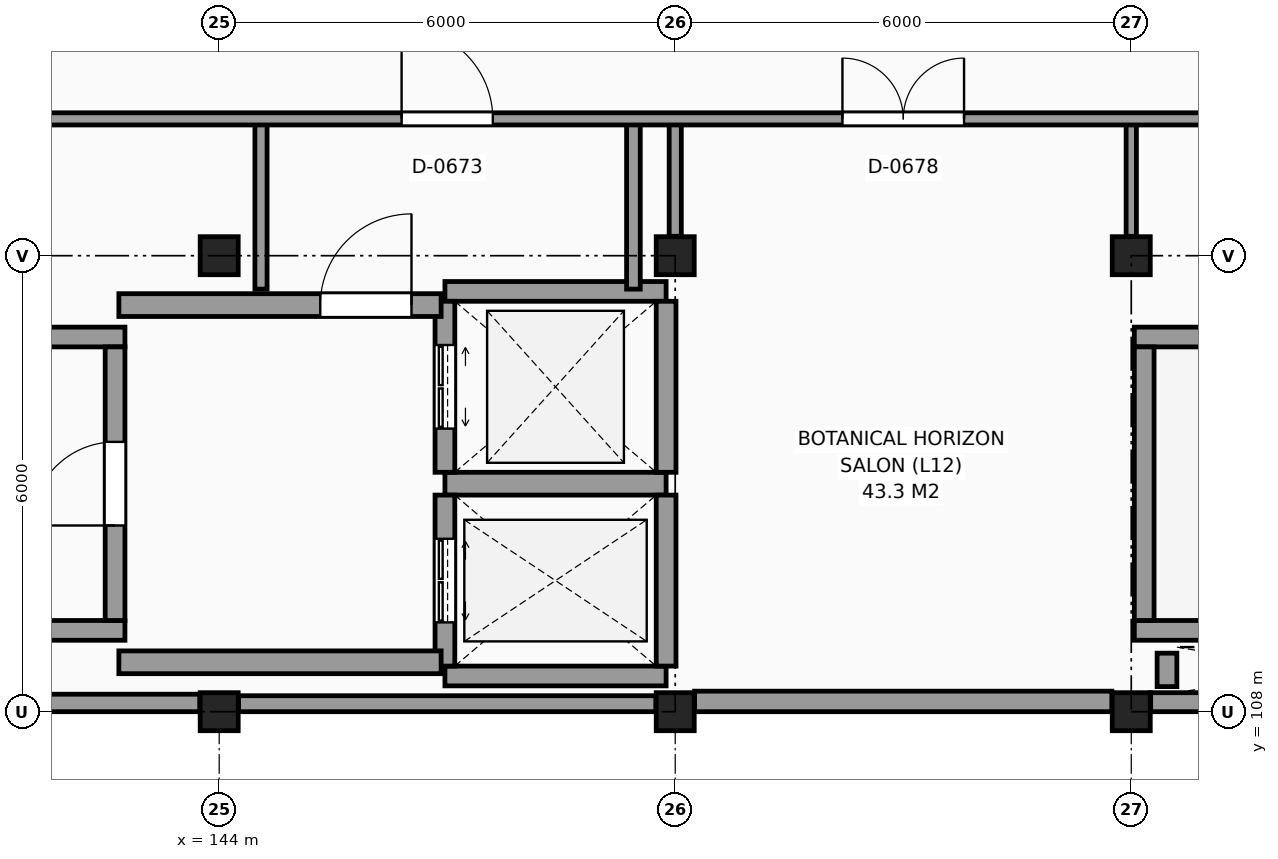
"""IFC4 building model, lengths in metres.
Left out: names, types, materials, properties, quantities, classifications, styles, units other than length and angle.
Written with IfcOpenShell. Run it as: python <this file> out.ifc"""

import sys

from ifc_helpers import new_model, si_unit, direction, frame, frame_2d, origin, origin_2d, place, context, subcontext, project, spatial, rectangle, extrude, element, fill, save


model = new_model("IFC4")
c1 = context("Model", 3, precision=1e-05, world=origin(), true_north=direction((0.0, 1.0)))
c2 = subcontext(c1, "Body", "Model", "MODEL_VIEW")
j1 = project(units=[si_unit("LENGTHUNIT", "METRE"), si_unit("PLANEANGLEUNIT", "RADIAN")], contexts=[c1])
p1 = place(None, origin())
s1 = spatial("IfcSite", under=j1, at=p1, CompositionType="ELEMENT")
p2 = place(p1, origin())
s2 = spatial("IfcBuilding", under=s1, at=p2, CompositionType="ELEMENT")
p3 = place(p2, frame((0.0, 0.0, 48.0)))
s3 = spatial("IfcBuildingStorey", under=s2, at=p3, CompositionType="ELEMENT", Elevation=48.0)
for number, where, z_axis, x_axis in (
    (1, (144.0, 108.0, 0.0), (0.0, 0.0, 1.0), (1.0, 0.0, 0.0)),
    (2, (144.0, 114.0, 0.0), (0.0, 0.0, 1.0), (1.0, 0.0, 0.0)),
    (3, (150.0, 108.0, 0.0), (0.0, 0.0, 1.0), (1.0, 0.0, 0.0)),
    (4, (150.0, 114.0, 0.0), (0.0, 0.0, 1.0), (1.0, 0.0, 0.0)),
    (5, (156.0, 108.0, 0.0), (0.0, 0.0, 1.0), (1.0, 0.0, 0.0)),
    (6, (156.0, 114.0, 0.0), (0.0, 0.0, 1.0), (1.0, 0.0, 0.0)),
):
    element("IfcColumn", number, at=place(p3, frame(where, z_axis=z_axis, x_axis=x_axis)), inside=s3, PredefinedType="COLUMN", context=c2, shape_type="SweptSolid", body=[
        extrude(rectangle(XDim=0.5, YDim=0.5, at=origin_2d()), origin(), (0.0, 0.0, 1.0), 3.3),
    ])
p4 = place(p3, frame((138.255, 108.115, 0.0), z_axis=(0.0, 0.0, 1.0), x_axis=(1.0, 0.0, 0.0)))
e7 = element("IfcWall", 7, at=p4, inside=s3, PredefinedType="SOLIDWALL", context=c2, shape_type="SweptSolid", body=[
    extrude(rectangle(XDim=5.49, YDim=0.23, at=frame_2d((2.745, 0.0))), origin(), (0.0, 0.0, 1.0), 2.4),
])
p5 = place(p3, frame((144.255, 108.105, 0.0), z_axis=(0.0, 0.0, 1.0), x_axis=(1.0, 0.0, 0.0)))
e8 = element("IfcWall", 8, at=p5, inside=s3, PredefinedType="SOLIDWALL", context=c2, shape_type="SweptSolid", body=[
    extrude(rectangle(XDim=5.49, YDim=0.21, at=frame_2d((2.745, 0.0))), origin(), (0.0, 0.0, 1.0), 2.4),
])
p6 = place(p3, frame((150.255, 108.135, 0.0), z_axis=(0.0, 0.0, 1.0), x_axis=(1.0, 0.0, 0.0)))
e9 = element("IfcWall", 9, at=p6, inside=s3, PredefinedType="SOLIDWALL", context=c2, shape_type="SweptSolid", body=[
    extrude(rectangle(XDim=5.49, YDim=0.27, at=frame_2d((2.745, 0.0))), origin(), (0.0, 0.0, 1.0), 2.4),
])
p7 = place(p3, frame((156.255, 108.125, 0.0), z_axis=(0.0, 0.0, 1.0), x_axis=(1.0, 0.0, 0.0)))
e10 = element("IfcWall", 10, at=p7, inside=s3, PredefinedType="SOLIDWALL", context=c2, shape_type="SweptSolid", body=[
    extrude(rectangle(XDim=5.49, YDim=0.25, at=frame_2d((2.745, 0.0))), origin(), (0.0, 0.0, 1.0), 3.05),
])
for number, where, z_axis, x_axis in (
    (11, (156.04, 109.07, 0.0), (0.0, 0.0, 1.0), (1.0, 0.0, 0.0)),
    (12, (156.04, 112.93, 0.0), (0.0, 0.0, 1.0), (1.0, 0.0, 0.0)),
):
    element("IfcWall", number, at=place(p3, frame(where, z_axis=z_axis, x_axis=x_axis)), inside=s3, PredefinedType="SHEAR", context=c2, shape_type="SweptSolid", body=[
        extrude(rectangle(XDim=10.72, YDim=0.26, at=frame_2d((5.36, 0.0))), origin(), (0.0, 0.0, 1.0), 3.3),
    ])
p8 = place(p3, frame((156.17, 109.2, 0.0), z_axis=(0.0, 0.0, 1.0), x_axis=(0.0, 1.0, 0.0)))
e13 = element("IfcWall", 13, at=p8, inside=s3, PredefinedType="SHEAR", context=c2, shape_type="SweptSolid", body=[
    extrude(rectangle(XDim=3.6, YDim=0.26, at=frame_2d((1.8, 0.0))), origin(), (0.0, 0.0, 1.0), 3.3),
])
p9 = place(p3, frame((156.47, 108.33, 0.0), z_axis=(0.0, 0.0, 1.0), x_axis=(0.0, 1.0, 0.0)))
e14 = element("IfcWall", 14, at=p9, inside=s3, PredefinedType="SHEAR", context=c2, shape_type="SweptSolid", body=[
    extrude(rectangle(XDim=0.44, YDim=0.26, at=frame_2d((0.22, 0.0))), origin(), (0.0, 0.0, 1.0), 3.3),
])
for number, where, z_axis, x_axis in (
    (15, (132.04, 109.07, 0.0), (0.0, 0.0, 1.0), (1.0, 0.0, 0.0)),
    (16, (132.04, 112.93, 0.0), (0.0, 0.0, 1.0), (1.0, 0.0, 0.0)),
):
    element("IfcWall", number, at=place(p3, frame(where, z_axis=z_axis, x_axis=x_axis)), inside=s3, PredefinedType="SHEAR", context=c2, shape_type="SweptSolid", body=[
        extrude(rectangle(XDim=10.72, YDim=0.26, at=frame_2d((5.36, 0.0))), origin(), (0.0, 0.0, 1.0), 3.3),
    ])
p10 = place(p3, frame((142.63, 109.2, 0.0), z_axis=(0.0, 0.0, 1.0), x_axis=(0.0, 1.0, 0.0)))
e17 = element("IfcWall", 17, at=p10, inside=s3, PredefinedType="SHEAR", context=c2, shape_type="SweptSolid", body=[
    extrude(rectangle(XDim=3.6, YDim=0.26, at=frame_2d((1.8, 0.0))), origin(), (0.0, 0.0, 1.0), 3.3),
])
p11 = place(p10, frame((1.25, 0.0, 0.0)))
e18 = element("IfcOpeningElement", 18, at=p11, cuts=e17, PredefinedType="OPENING", context=c2, shape_type="SweptSolid", body=[
    extrude(rectangle(XDim=1.1, YDim=2.15, at=frame_2d((0.55, 1.075))), frame((0.0, 0.14, 0.0), z_axis=(0.0, -1.0, 0.0), x_axis=(1.0, 0.0, 0.0)), (0.0, 0.0, 1.0), 0.28),
])
p12 = place(p3, frame((146.97, 108.47, 0.0), z_axis=(0.0, 0.0, 1.0), x_axis=(1.0, 0.0, 0.0)))
e19 = element("IfcWall", 19, at=p12, inside=s3, PredefinedType="SHEAR", context=c2, shape_type="SweptSolid", body=[
    extrude(rectangle(XDim=2.91, YDim=0.26, at=frame_2d((1.455, 0.0))), origin(), (0.0, 0.0, 1.0), 3.3),
])
p13 = place(p3, frame((146.97, 111.0, 0.0), z_axis=(0.0, 0.0, 1.0), x_axis=(1.0, 0.0, 0.0)))
e20 = element("IfcWall", 20, at=p13, inside=s3, PredefinedType="SHEAR", context=c2, shape_type="SweptSolid", body=[
    extrude(rectangle(XDim=2.91, YDim=0.3, at=frame_2d((1.455, 0.0))), origin(), (0.0, 0.0, 1.0), 3.3),
])
p14 = place(p3, frame((149.88, 108.6, 0.0), z_axis=(0.0, 0.0, 1.0), x_axis=(0.0, 1.0, 0.0)))
e21 = element("IfcWall", 21, at=p14, inside=s3, PredefinedType="SHEAR", context=c2, shape_type="SweptSolid", body=[
    extrude(rectangle(XDim=2.25, YDim=0.26, at=frame_2d((1.125, 0.0))), origin(), (0.0, 0.0, 1.0), 3.3),
])
p15 = place(p3, frame((146.97, 108.6, 0.0), z_axis=(0.0, 0.0, 1.0), x_axis=(0.0, 1.0, 0.0)))
e22 = element("IfcWall", 22, at=p15, inside=s3, PredefinedType="SHEAR", context=c2, shape_type="SweptSolid", body=[
    extrude(rectangle(XDim=2.25, YDim=0.26, at=frame_2d((1.125, 0.0))), origin(), (0.0, 0.0, 1.0), 3.3),
])
p16 = place(p15, frame((0.575, 0.0, 0.0)))
e23 = element("IfcOpeningElement", 23, at=p16, cuts=e22, PredefinedType="OPENING", context=c2, shape_type="SweptSolid", body=[
    extrude(rectangle(XDim=1.1, YDim=2.2, at=frame_2d((0.55, 1.1))), frame((0.0, 0.14, 0.0), z_axis=(0.0, -1.0, 0.0), x_axis=(1.0, 0.0, 0.0)), (0.0, 0.0, 1.0), 0.28),
])
p17 = place(p3, frame((146.97, 113.53, 0.0), z_axis=(0.0, 0.0, 1.0), x_axis=(1.0, 0.0, 0.0)))
e24 = element("IfcWall", 24, at=p17, inside=s3, PredefinedType="SHEAR", context=c2, shape_type="SweptSolid", body=[
    extrude(rectangle(XDim=2.91, YDim=0.26, at=frame_2d((1.455, 0.0))), origin(), (0.0, 0.0, 1.0), 3.3),
])
p18 = place(p3, frame((149.88, 111.15, 0.0), z_axis=(0.0, 0.0, 1.0), x_axis=(0.0, 1.0, 0.0)))
e25 = element("IfcWall", 25, at=p18, inside=s3, PredefinedType="SHEAR", context=c2, shape_type="SweptSolid", body=[
    extrude(rectangle(XDim=2.25, YDim=0.26, at=frame_2d((1.125, 0.0))), origin(), (0.0, 0.0, 1.0), 3.3),
])
p19 = place(p3, frame((146.97, 111.15, 0.0), z_axis=(0.0, 0.0, 1.0), x_axis=(0.0, 1.0, 0.0)))
e26 = element("IfcWall", 26, at=p19, inside=s3, PredefinedType="SHEAR", context=c2, shape_type="SweptSolid", body=[
    extrude(rectangle(XDim=2.25, YDim=0.26, at=frame_2d((1.125, 0.0))), origin(), (0.0, 0.0, 1.0), 3.3),
])
p20 = place(p19, frame((0.575, 0.0, 0.0)))
e27 = element("IfcOpeningElement", 27, at=p20, cuts=e26, PredefinedType="OPENING", context=c2, shape_type="SweptSolid", body=[
    extrude(rectangle(XDim=1.1, YDim=2.2, at=frame_2d((0.55, 1.1))), frame((0.0, 0.14, 0.0), z_axis=(0.0, -1.0, 0.0), x_axis=(1.0, 0.0, 0.0)), (0.0, 0.0, 1.0), 0.28),
])
p21 = place(p3, frame((142.68, 113.35, 0.0), z_axis=(0.0, 0.0, 1.0), x_axis=(1.0, 0.0, 0.0)))
e28 = element("IfcWall", 28, at=p21, inside=s3, PredefinedType="SHEAR", context=c2, shape_type="SweptSolid", body=[
    extrude(rectangle(XDim=4.24, YDim=0.3, at=frame_2d((2.12, 0.0))), origin(), (0.0, 0.0, 1.0), 3.3),
])
p22 = place(p21, frame((2.65, 0.0, 0.0)))
e29 = element("IfcOpeningElement", 29, at=p22, cuts=e28, PredefinedType="OPENING", context=c2, shape_type="SweptSolid", body=[
    extrude(rectangle(XDim=1.2, YDim=2.2, at=frame_2d((0.6, 1.1))), frame((0.0, 0.16, 0.0), z_axis=(0.0, -1.0, 0.0), x_axis=(1.0, 0.0, 0.0)), (0.0, 0.0, 1.0), 0.32),
])
p23 = place(p3, frame((142.68, 108.65, 0.0), z_axis=(0.0, 0.0, 1.0), x_axis=(1.0, 0.0, 0.0)))
e30 = element("IfcWall", 30, at=p23, inside=s3, PredefinedType="SHEAR", context=c2, shape_type="SweptSolid", body=[
    extrude(rectangle(XDim=4.24, YDim=0.3, at=frame_2d((2.12, 0.0))), origin(), (0.0, 0.0, 1.0), 3.3),
])
p24 = place(p3, frame((144.55, 113.56, 0.0), z_axis=(0.0, 0.0, 1.0), x_axis=(0.0, 1.0, 0.0)))
e31 = element("IfcWall", 31, at=p24, inside=s3, PredefinedType="PARTITIONING", context=c2, shape_type="SweptSolid", body=[
    extrude(rectangle(XDim=2.24, YDim=0.16, at=frame_2d((1.12, 0.0))), origin(), (0.0, 0.0, 1.0), 3.05),
])
p25 = place(p3, frame((149.45, 113.56, 0.0), z_axis=(0.0, 0.0, 1.0), x_axis=(0.0, 1.0, 0.0)))
e32 = element("IfcWall", 32, at=p25, inside=s3, PredefinedType="PARTITIONING", context=c2, shape_type="SweptSolid", body=[
    extrude(rectangle(XDim=2.24, YDim=0.18, at=frame_2d((1.12, 0.0))), origin(), (0.0, 0.0, 1.0), 3.05),
])
p26 = place(p3, frame((150.0, 114.255, 0.0), z_axis=(0.0, 0.0, 1.0), x_axis=(0.0, 1.0, 0.0)))
e33 = element("IfcWall", 33, at=p26, inside=s3, PredefinedType="PARTITIONING", context=c2, shape_type="SweptSolid", body=[
    extrude(rectangle(XDim=1.545, YDim=0.16, at=frame_2d((0.772, 0.0))), origin(), (0.0, 0.0, 1.0), 2.5),
])
p27 = place(p3, frame((156.0, 114.255, 0.0), z_axis=(0.0, 0.0, 1.0), x_axis=(0.0, 1.0, 0.0)))
e34 = element("IfcWall", 34, at=p27, inside=s3, PredefinedType="PARTITIONING", context=c2, shape_type="SweptSolid", body=[
    extrude(rectangle(XDim=1.545, YDim=0.135, at=frame_2d((0.772, 0.0))), origin(), (0.0, 0.0, 1.0), 2.5),
])
p28 = place(p3, frame((102.235, 115.8, 0.0), z_axis=(0.0, 0.0, 1.0), x_axis=(1.0, 0.0, 0.0)))
e35 = element("IfcWall", 35, at=p28, inside=s3, PredefinedType="PARTITIONING", context=c2, shape_type="SweptSolid", body=[
    extrude(rectangle(XDim=67.565, YDim=0.16, at=frame_2d((33.782, 0.0))), origin(), (0.0, 0.0, 1.0), 3.05),
])
p29 = place(p28, frame((44.165, 0.0, 0.0)))
e36 = element("IfcOpeningElement", 36, at=p29, cuts=e35, PredefinedType="OPENING", context=c2, shape_type="SweptSolid", body=[
    extrude(rectangle(XDim=1.2, YDim=2.2, at=frame_2d((0.6, 1.1))), frame((0.0, 0.09, 0.0), z_axis=(0.0, -1.0, 0.0), x_axis=(1.0, 0.0, 0.0)), (0.0, 0.0, 1.0), 0.18),
])
p30 = place(p28, frame((14.165, 0.0, 0.0)))
e37 = element("IfcOpeningElement", 37, at=p30, cuts=e35, PredefinedType="OPENING", context=c2, shape_type="SweptSolid", body=[
    extrude(rectangle(XDim=1.2, YDim=2.2, at=frame_2d((0.6, 1.1))), frame((0.0, 0.09, 0.0), z_axis=(0.0, -1.0, 0.0), x_axis=(1.0, 0.0, 0.0)), (0.0, 0.0, 1.0), 0.18),
])
p31 = place(p28, frame((19.315, 0.0, 0.0)))
e38 = element("IfcOpeningElement", 38, at=p31, cuts=e35, PredefinedType="OPENING", context=c2, shape_type="SweptSolid", body=[
    extrude(rectangle(XDim=1.0, YDim=2.15, at=frame_2d((0.5, 1.075))), frame((0.0, 0.09, 0.0), z_axis=(0.0, -1.0, 0.0), x_axis=(1.0, 0.0, 0.0)), (0.0, 0.0, 1.0), 0.18),
])
p32 = place(p28, frame((26.285, 0.0, 0.0)))
e39 = element("IfcOpeningElement", 39, at=p32, cuts=e35, PredefinedType="OPENING", context=c2, shape_type="SweptSolid", body=[
    extrude(rectangle(XDim=0.96, YDim=2.15, at=frame_2d((0.48, 1.075))), frame((0.0, 0.09, 0.0), z_axis=(0.0, -1.0, 0.0), x_axis=(1.0, 0.0, 0.0)), (0.0, 0.0, 1.0), 0.18),
])
p33 = place(p28, frame((49.965, 0.0, 0.0)))
e40 = element("IfcOpeningElement", 40, at=p33, cuts=e35, PredefinedType="OPENING", context=c2, shape_type="SweptSolid", body=[
    extrude(rectangle(XDim=1.6, YDim=2.25, at=frame_2d((0.8, 1.125))), frame((0.0, 0.09, 0.0), z_axis=(0.0, -1.0, 0.0), x_axis=(1.0, 0.0, 0.0)), (0.0, 0.0, 1.0), 0.18),
])
p34 = place(p11, origin())
e41 = element("IfcDoor", 41, at=p34, inside=s3, OperationType="SINGLE_SWING_LEFT", PredefinedType="DOOR", context=c2, shape_type="SweptSolid", body=[
    extrude(rectangle(XDim=1.1, YDim=2.15, at=frame_2d((0.55, 1.075))), frame((0.0, 0.025, 0.0), z_axis=(0.0, -1.0, 0.0), x_axis=(1.0, 0.0, 0.0)), (0.0, 0.0, 1.0), 0.05),
])
fill(e18, e41)
p35 = place(p16, origin())
e42 = element("IfcDoor", 42, at=p35, inside=s3, OperationType="DOUBLE_DOOR_SLIDING", PredefinedType="DOOR", context=c2, shape_type="SweptSolid", body=[
    extrude(rectangle(XDim=1.1, YDim=2.2, at=frame_2d((0.55, 1.1))), frame((0.0, 0.025, 0.0), z_axis=(0.0, -1.0, 0.0), x_axis=(1.0, 0.0, 0.0)), (0.0, 0.0, 1.0), 0.05),
])
fill(e23, e42)
p36 = place(p20, origin())
e43 = element("IfcDoor", 43, at=p36, inside=s3, OperationType="DOUBLE_DOOR_SLIDING", PredefinedType="DOOR", context=c2, shape_type="SweptSolid", body=[
    extrude(rectangle(XDim=1.1, YDim=2.2, at=frame_2d((0.55, 1.1))), frame((0.0, 0.025, 0.0), z_axis=(0.0, -1.0, 0.0), x_axis=(1.0, 0.0, 0.0)), (0.0, 0.0, 1.0), 0.05),
])
fill(e27, e43)
p37 = place(p22, origin())
e44 = element("IfcDoor", 44, at=p37, inside=s3, OperationType="SINGLE_SWING_RIGHT", PredefinedType="DOOR", context=c2, shape_type="SweptSolid", body=[
    extrude(rectangle(XDim=1.2, YDim=2.2, at=frame_2d((0.6, 1.1))), frame((0.0, 0.025, 0.0), z_axis=(0.0, -1.0, 0.0), x_axis=(1.0, 0.0, 0.0)), (0.0, 0.0, 1.0), 0.05),
])
fill(e29, e44)
p38 = place(p29, origin())
e45 = element("IfcDoor", 45, at=p38, inside=s3, OperationType="SINGLE_SWING_LEFT", PredefinedType="DOOR", context=c2, shape_type="SweptSolid", body=[
    extrude(rectangle(XDim=1.2, YDim=2.2, at=frame_2d((0.6, 1.1))), frame((0.0, 0.025, 0.0), z_axis=(0.0, -1.0, 0.0), x_axis=(1.0, 0.0, 0.0)), (0.0, 0.0, 1.0), 0.05),
])
fill(e36, e45)
p39 = place(p33, origin())
e46 = element("IfcDoor", 46, at=p39, inside=s3, OperationType="DOUBLE_DOOR_SINGLE_SWING", PredefinedType="DOOR", context=c2, shape_type="SweptSolid", body=[
    extrude(rectangle(XDim=1.6, YDim=2.25, at=frame_2d((0.8, 1.125))), frame((0.0, 0.025, 0.0), z_axis=(0.0, -1.0, 0.0), x_axis=(1.0, 0.0, 0.0)), (0.0, 0.0, 1.0), 0.05),
])
fill(e40, e46)
save(model, sys.argv[1])
